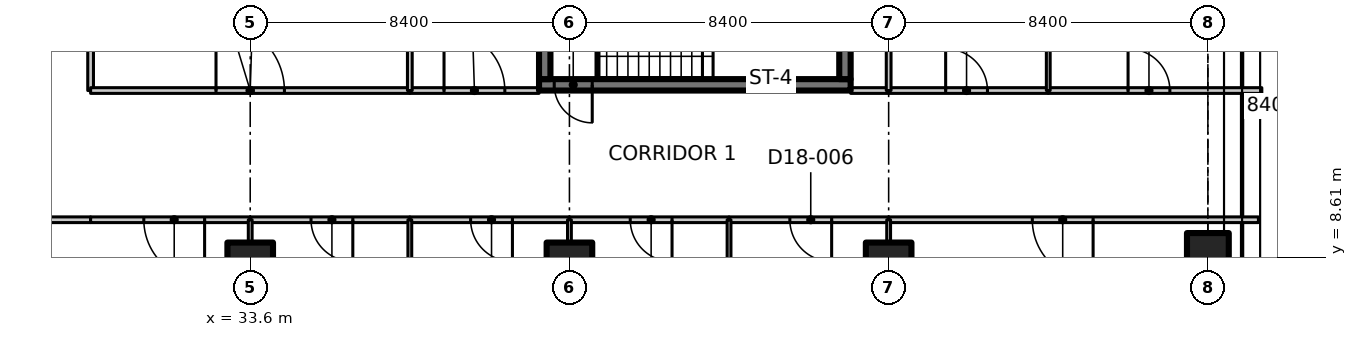
"""IFC4 building model, lengths in metres.
Left out: names, types, materials, properties, quantities, classifications, styles, units other than length and angle.
Written with IfcOpenShell. Run it as: python <this file> out.ifc"""

import sys

from ifc_helpers import new_model, si_unit, direction, frame, frame_2d, origin, origin_2d, place, context, subcontext, project, spatial, polyline, rectangle, outline, extrude, element, fill, save


model = new_model("IFC4")
c1 = context("Model", 3, precision=1e-05, world=origin(), true_north=direction((0.0, 1.0)))
c2 = subcontext(c1, "Body", "Model", "MODEL_VIEW")
j1 = project(units=[si_unit("LENGTHUNIT", "METRE"), si_unit("PLANEANGLEUNIT", "RADIAN")], contexts=[c1])
p1 = place(None, origin())
s1 = spatial("IfcSite", under=j1, at=p1, CompositionType="ELEMENT")
p2 = place(p1, origin())
s2 = spatial("IfcBuilding", under=s1, at=p2, CompositionType="ELEMENT")
p3 = place(p2, frame((0.0, 0.0, 152.9)))
s3 = spatial("IfcBuildingStorey", under=s2, at=p3, CompositionType="ELEMENT", Elevation=152.9)
for number, where, z_axis, x_axis in (
    (1, (33.6, 8.4, 0.0), (0.0, 0.0, 1.0), (1.0, 0.0, 0.0)),
    (2, (42.0, 8.4, 0.0), (0.0, 0.0, 1.0), (1.0, 0.0, 0.0)),
    (3, (50.4, 8.4, 0.0), (0.0, 0.0, 1.0), (1.0, 0.0, 0.0)),
):
    element("IfcColumn", number, at=place(p3, frame(where, z_axis=z_axis, x_axis=x_axis)), inside=s3, PredefinedType="COLUMN", context=c2, shape_type="SweptSolid", body=[
        extrude(rectangle(XDim=1.2, YDim=1.2, at=origin_2d()), origin(), (0.0, 0.0, 1.0), 3.3),
    ])
p4 = place(p3, frame((58.8, 8.4, 0.0), z_axis=(0.0, 0.0, 1.0), x_axis=(1.0, 0.0, 0.0)))
e4 = element("IfcColumn", 4, at=p4, inside=s3, PredefinedType="COLUMN", context=c2, shape_type="SweptSolid", body=[
    extrude(rectangle(XDim=1.1, YDim=1.7, at=origin_2d()), origin(), (0.0, 0.0, 1.0), 3.3),
])
p5 = place(p3, frame((49.4, 13.15, 0.0), z_axis=(0.0, 0.0, 1.0), x_axis=(-1.0, 0.0, 0.0)))
e5 = element("IfcWall", 5, at=p5, inside=s3, PredefinedType="SHEAR", context=c2, shape_type="SweptSolid", body=[
    extrude(rectangle(XDim=8.2, YDim=0.3, at=frame_2d((4.1, 0.0))), origin(), (0.0, 0.0, 1.0), 3.3),
])
p6 = place(p5, frame((6.8, 0.0, 0.0)))
e6 = element("IfcOpeningElement", 6, at=p6, cuts=e5, PredefinedType="OPENING", context=c2, shape_type="SweptSolid", body=[
    extrude(rectangle(XDim=1.0, YDim=2.1, at=frame_2d((0.5, 1.05))), frame((0.0, 0.16, 0.0), z_axis=(0.0, -1.0, 0.0), x_axis=(1.0, 0.0, 0.0)), (0.0, 0.0, 1.0), 0.32),
])
for number, where, z_axis, x_axis in (
    (7, (41.35, 13.3, 0.0), (0.0, 0.0, 1.0), (0.0, 1.0, 0.0)),
    (8, (49.25, 13.3, 0.0), (0.0, 0.0, 1.0), (0.0, 1.0, 0.0)),
):
    element("IfcWall", number, at=place(p3, frame(where, z_axis=z_axis, x_axis=x_axis)), inside=s3, PredefinedType="SHEAR", context=c2, shape_type="SweptSolid", body=[
        extrude(rectangle(XDim=2.55, YDim=0.3, at=frame_2d((1.275, 0.0))), origin(), (0.0, 0.0, 1.0), 3.3),
    ])
p7 = place(p3, frame((29.4, 9.6, 0.0), z_axis=(0.0, 0.0, 1.0), x_axis=(-1.0, 0.0, 0.0)))
e9 = element("IfcWall", 9, at=p7, inside=s3, PredefinedType="PARTITIONING", context=c2, shape_type="SweptSolid", body=[
    extrude(rectangle(XDim=4.2, YDim=0.15, at=frame_2d((2.1, 0.0))), origin(), (0.0, 0.0, 1.0), 3.28),
])
p8 = place(p3, frame((29.4, 21.2, 0.0), z_axis=(0.0, 0.0, 1.0), x_axis=(0.0, -1.0, 0.0)))
e10 = element("IfcWall", 10, at=p8, inside=s3, PredefinedType="PARTITIONING", context=c2, shape_type="SweptSolid", body=[
    extrude(rectangle(XDim=8.2, YDim=0.15, at=frame_2d((4.1, 0.0))), origin(), (0.0, 0.0, 1.0), 3.28),
])
p9 = place(p3, frame((33.6, 9.6, 0.0), z_axis=(0.0, 0.0, 1.0), x_axis=(-1.0, 0.0, 0.0)))
e11 = element("IfcWall", 11, at=p9, inside=s3, PredefinedType="PARTITIONING", context=c2, shape_type="SweptSolid", body=[
    extrude(rectangle(XDim=4.2, YDim=0.15, at=frame_2d((2.1, 0.0))), origin(), (0.0, 0.0, 1.0), 3.28),
])
p10 = place(p9, frame((1.2, 0.0, 0.0)))
e12 = element("IfcOpeningElement", 12, at=p10, cuts=e11, PredefinedType="OPENING", context=c2, shape_type="SweptSolid", body=[
    extrude(rectangle(XDim=1.6, YDim=2.1, at=frame_2d((0.8, 1.05))), frame((0.0, 0.085, 0.0), z_axis=(0.0, -1.0, 0.0), x_axis=(1.0, 0.0, 0.0)), (0.0, 0.0, 1.0), 0.17),
])
p11 = place(p3, frame((37.8, 9.6, 0.0), z_axis=(0.0, 0.0, 1.0), x_axis=(-1.0, 0.0, 0.0)))
e13 = element("IfcWall", 13, at=p11, inside=s3, PredefinedType="PARTITIONING", context=c2, shape_type="SweptSolid", body=[
    extrude(rectangle(XDim=4.2, YDim=0.15, at=frame_2d((2.1, 0.0))), origin(), (0.0, 0.0, 1.0), 3.28),
])
p12 = place(p11, frame((1.5, 0.0, 0.0)))
e14 = element("IfcOpeningElement", 14, at=p12, cuts=e13, PredefinedType="OPENING", context=c2, shape_type="SweptSolid", body=[
    extrude(rectangle(XDim=1.1, YDim=2.1, at=frame_2d((0.55, 1.05))), frame((0.0, 0.085, 0.0), z_axis=(0.0, -1.0, 0.0), x_axis=(1.0, 0.0, 0.0)), (0.0, 0.0, 1.0), 0.17),
])
p13 = place(p3, frame((42.0, 9.6, 0.0), z_axis=(0.0, 0.0, 1.0), x_axis=(-1.0, 0.0, 0.0)))
e15 = element("IfcWall", 15, at=p13, inside=s3, PredefinedType="PARTITIONING", context=c2, shape_type="SweptSolid", body=[
    extrude(rectangle(XDim=4.2, YDim=0.15, at=frame_2d((2.1, 0.0))), origin(), (0.0, 0.0, 1.0), 3.28),
])
p14 = place(p13, frame((1.5, 0.0, 0.0)))
e16 = element("IfcOpeningElement", 16, at=p14, cuts=e15, PredefinedType="OPENING", context=c2, shape_type="SweptSolid", body=[
    extrude(rectangle(XDim=1.1, YDim=2.1, at=frame_2d((0.55, 1.05))), frame((0.0, 0.085, 0.0), z_axis=(0.0, -1.0, 0.0), x_axis=(1.0, 0.0, 0.0)), (0.0, 0.0, 1.0), 0.17),
])
p15 = place(p3, frame((46.2, 9.6, 0.0), z_axis=(0.0, 0.0, 1.0), x_axis=(-1.0, 0.0, 0.0)))
e17 = element("IfcWall", 17, at=p15, inside=s3, PredefinedType="PARTITIONING", context=c2, shape_type="SweptSolid", body=[
    extrude(rectangle(XDim=4.2, YDim=0.15, at=frame_2d((2.1, 0.0))), origin(), (0.0, 0.0, 1.0), 3.28),
])
p16 = place(p15, frame((1.5, 0.0, 0.0)))
e18 = element("IfcOpeningElement", 18, at=p16, cuts=e17, PredefinedType="OPENING", context=c2, shape_type="SweptSolid", body=[
    extrude(rectangle(XDim=1.1, YDim=2.1, at=frame_2d((0.55, 1.05))), frame((0.0, 0.085, 0.0), z_axis=(0.0, -1.0, 0.0), x_axis=(1.0, 0.0, 0.0)), (0.0, 0.0, 1.0), 0.17),
])
p17 = place(p3, frame((50.4, 9.6, 0.0), z_axis=(0.0, 0.0, 1.0), x_axis=(-1.0, 0.0, 0.0)))
e19 = element("IfcWall", 19, at=p17, inside=s3, PredefinedType="PARTITIONING", context=c2, shape_type="SweptSolid", body=[
    extrude(rectangle(XDim=4.2, YDim=0.15, at=frame_2d((2.1, 0.0))), origin(), (0.0, 0.0, 1.0), 3.28),
])
p18 = place(p17, frame((1.5, 0.0, 0.0)))
e20 = element("IfcOpeningElement", 20, at=p18, cuts=e19, PredefinedType="OPENING", context=c2, shape_type="SweptSolid", body=[
    extrude(rectangle(XDim=1.1, YDim=2.1, at=frame_2d((0.55, 1.05))), frame((0.0, 0.085, 0.0), z_axis=(0.0, -1.0, 0.0), x_axis=(1.0, 0.0, 0.0)), (0.0, 0.0, 1.0), 0.17),
])
p19 = place(p3, frame((60.131, 9.6, 0.0), z_axis=(0.0, 0.0, 1.0), x_axis=(-1.0, 0.0, 0.0)))
e21 = element("IfcWall", 21, at=p19, inside=s3, PredefinedType="PARTITIONING", context=c2, shape_type="SweptSolid", body=[
    extrude(outline(polyline([(0.0, 0.0), (9.731, 0.0), (9.73, 3.28), (1.781, 3.28), (1.779, 2.93), (0.883, 2.93), (0.881, 3.28), (0.25, 3.28), (0.0, 3.28), (0.0, 0.0)])), frame((0.0, 0.075, 0.0), z_axis=(0.0, -1.0, 0.0), x_axis=(1.0, 0.0, 0.0)), (0.0, 0.0, 1.0), 0.15),
])
p20 = place(p19, frame((4.351, 0.0, 0.0)))
e22 = element("IfcOpeningElement", 22, at=p20, cuts=e21, PredefinedType="OPENING", context=c2, shape_type="SweptSolid", body=[
    extrude(rectangle(XDim=1.6, YDim=2.1, at=frame_2d((0.8, 1.05))), frame((0.0, 0.085, 0.0), z_axis=(0.0, -1.0, 0.0), x_axis=(1.0, 0.0, 0.0)), (0.0, 0.0, 1.0), 0.17),
])
p21 = place(p3, frame((29.4, 13.0, 0.0), z_axis=(0.0, 0.0, 1.0), x_axis=(1.0, 0.0, 0.0)))
e23 = element("IfcWall", 23, at=p21, inside=s3, PredefinedType="PARTITIONING", context=c2, shape_type="SweptSolid", body=[
    extrude(rectangle(XDim=8.4, YDim=0.15, at=frame_2d((4.2, 0.0))), origin(), (0.0, 0.0, 1.0), 3.28),
])
p22 = place(p21, frame((3.3, 0.0, 0.0)))
e24 = element("IfcOpeningElement", 24, at=p22, cuts=e23, PredefinedType="OPENING", context=c2, shape_type="SweptSolid", body=[
    extrude(rectangle(XDim=1.8, YDim=2.1, at=frame_2d((0.9, 1.05))), frame((0.0, 0.085, 0.0), z_axis=(0.0, -1.0, 0.0), x_axis=(1.0, 0.0, 0.0)), (0.0, 0.0, 1.0), 0.17),
])
p23 = place(p3, frame((37.8, 13.0, 0.0), z_axis=(0.0, 0.0, 1.0), x_axis=(1.0, 0.0, 0.0)))
e25 = element("IfcWall", 25, at=p23, inside=s3, PredefinedType="PARTITIONING", context=c2, shape_type="SweptSolid", body=[
    extrude(rectangle(XDim=3.4, YDim=0.15, at=frame_2d((1.7, 0.0))), origin(), (0.0, 0.0, 1.0), 3.28),
])
p24 = place(p23, frame((0.9, 0.0, 0.0)))
e26 = element("IfcOpeningElement", 26, at=p24, cuts=e25, PredefinedType="OPENING", context=c2, shape_type="SweptSolid", body=[
    extrude(rectangle(XDim=1.6, YDim=2.1, at=frame_2d((0.8, 1.05))), frame((0.0, 0.085, 0.0), z_axis=(0.0, -1.0, 0.0), x_axis=(1.0, 0.0, 0.0)), (0.0, 0.0, 1.0), 0.17),
])
p25 = place(p3, frame((49.4, 13.0, 0.0), z_axis=(0.0, 0.0, 1.0), x_axis=(1.0, 0.0, 0.0)))
e27 = element("IfcWall", 27, at=p25, inside=s3, PredefinedType="PARTITIONING", context=c2, shape_type="SweptSolid", body=[
    extrude(rectangle(XDim=1.0, YDim=0.15, at=frame_2d((0.5, 0.0))), origin(), (0.0, 0.0, 1.0), 3.28),
])
p26 = place(p3, frame((50.4, 13.0, 0.0), z_axis=(0.0, 0.0, 1.0), x_axis=(1.0, 0.0, 0.0)))
e28 = element("IfcWall", 28, at=p26, inside=s3, PredefinedType="PARTITIONING", context=c2, shape_type="SweptSolid", body=[
    extrude(rectangle(XDim=4.2, YDim=0.15, at=frame_2d((2.1, 0.0))), origin(), (0.0, 0.0, 1.0), 3.28),
])
p27 = place(p26, frame((1.5, 0.0, 0.0)))
e29 = element("IfcOpeningElement", 29, at=p27, cuts=e28, PredefinedType="OPENING", context=c2, shape_type="SweptSolid", body=[
    extrude(rectangle(XDim=1.1, YDim=2.1, at=frame_2d((0.55, 1.05))), frame((0.0, 0.085, 0.0), z_axis=(0.0, -1.0, 0.0), x_axis=(1.0, 0.0, 0.0)), (0.0, 0.0, 1.0), 0.17),
])
p28 = place(p3, frame((54.6, 13.0, 0.0), z_axis=(0.0, 0.0, 1.0), x_axis=(1.0, 0.0, 0.0)))
e30 = element("IfcWall", 30, at=p28, inside=s3, PredefinedType="PARTITIONING", context=c2, shape_type="SweptSolid", body=[
    extrude(outline(polyline([(0.0, 0.0), (5.619, 0.0), (5.619, 3.28), (5.28, 3.28), (4.65, 3.28), (4.648, 2.93), (3.752, 2.93), (3.75, 3.28), (0.0, 3.28), (0.0, 0.0)])), frame((0.0, 0.075, 0.0), z_axis=(0.0, -1.0, 0.0), x_axis=(1.0, 0.0, 0.0)), (0.0, 0.0, 1.0), 0.15),
])
p29 = place(p28, frame((2.1, 0.0, 0.0)))
e31 = element("IfcOpeningElement", 31, at=p29, cuts=e30, PredefinedType="OPENING", context=c2, shape_type="SweptSolid", body=[
    extrude(rectangle(XDim=1.1, YDim=2.1, at=frame_2d((0.55, 1.05))), frame((0.0, 0.085, 0.0), z_axis=(0.0, -1.0, 0.0), x_axis=(1.0, 0.0, 0.0)), (0.0, 0.0, 1.0), 0.17),
])
p30 = place(p3, frame((33.6, 9.6, 0.0), z_axis=(0.0, 0.0, 1.0), x_axis=(0.0, -1.0, 0.0)))
e32 = element("IfcWall", 32, at=p30, inside=s3, PredefinedType="PARTITIONING", context=c2, shape_type="SweptSolid", body=[
    extrude(rectangle(XDim=0.58, YDim=0.1, at=frame_2d((0.29, 0.0))), origin(), (0.0, 0.0, 1.0), 3.28),
])
p31 = place(p3, frame((37.8, 9.6, 0.0), z_axis=(0.0, 0.0, 1.0), x_axis=(0.0, -1.0, 0.0)))
e33 = element("IfcWall", 33, at=p31, inside=s3, PredefinedType="PARTITIONING", context=c2, shape_type="SweptSolid", body=[
    extrude(outline(polyline([(0.0, 0.0), (10.965, 0.0), (10.965, 3.28), (10.7, 3.28), (10.05, 3.28), (10.048, 2.93), (9.152, 2.93), (9.15, 3.28), (0.0, 3.28), (0.0, 0.0)])), frame((0.0, 0.05, 0.0), z_axis=(0.0, -1.0, 0.0), x_axis=(1.0, 0.0, 0.0)), (0.0, 0.0, 1.0), 0.1),
])
p32 = place(p3, frame((42.0, 9.6, 0.0), z_axis=(0.0, 0.0, 1.0), x_axis=(0.0, -1.0, 0.0)))
e34 = element("IfcWall", 34, at=p32, inside=s3, PredefinedType="PARTITIONING", context=c2, shape_type="SweptSolid", body=[
    extrude(rectangle(XDim=0.58, YDim=0.1, at=frame_2d((0.29, 0.0))), origin(), (0.0, 0.0, 1.0), 3.28),
])
p33 = place(p3, frame((46.2, 9.6, 0.0), z_axis=(0.0, 0.0, 1.0), x_axis=(0.0, -1.0, 0.0)))
e35 = element("IfcWall", 35, at=p33, inside=s3, PredefinedType="PARTITIONING", context=c2, shape_type="SweptSolid", body=[
    extrude(outline(polyline([(0.0, 0.0), (10.965, 0.0), (10.965, 3.28), (10.7, 3.28), (10.05, 3.28), (10.048, 2.93), (9.152, 2.93), (9.15, 3.28), (0.0, 3.28), (0.0, 0.0)])), frame((0.0, 0.05, 0.0), z_axis=(0.0, -1.0, 0.0), x_axis=(1.0, 0.0, 0.0)), (0.0, 0.0, 1.0), 0.1),
])
p34 = place(p3, frame((50.4, 9.6, 0.0), z_axis=(0.0, 0.0, 1.0), x_axis=(0.0, -1.0, 0.0)))
e36 = element("IfcWall", 36, at=p34, inside=s3, PredefinedType="PARTITIONING", context=c2, shape_type="SweptSolid", body=[
    extrude(rectangle(XDim=0.58, YDim=0.1, at=frame_2d((0.29, 0.0))), origin(), (0.0, 0.0, 1.0), 3.28),
])
p35 = place(p3, frame((37.8, 30.243, 0.0), z_axis=(0.0, 0.0, 1.0), x_axis=(0.0, -1.0, 0.0)))
e37 = element("IfcWall", 37, at=p35, inside=s3, PredefinedType="PARTITIONING", context=c2, shape_type="SweptSolid", body=[
    extrude(outline(polyline([(0.0, 0.0), (17.243, 0.0), (17.243, 3.28), (5.493, 3.28), (5.491, 2.93), (4.595, 2.93), (4.593, 3.28), (0.0, 3.28), (0.0, 0.0)])), frame((0.0, 0.062, 0.0), z_axis=(0.0, -1.0, 0.0), x_axis=(1.0, 0.0, 0.0)), (0.0, 0.0, 1.0), 0.125),
])
p36 = place(p3, frame((50.4, 16.18, 0.0), z_axis=(0.0, 0.0, 1.0), x_axis=(0.0, -1.0, 0.0)))
e38 = element("IfcWall", 38, at=p36, inside=s3, PredefinedType="PARTITIONING", context=c2, shape_type="SweptSolid", body=[
    extrude(rectangle(XDim=3.18, YDim=0.125, at=frame_2d((1.59, 0.0))), origin(), (0.0, 0.0, 1.0), 3.28),
])
p37 = place(p3, frame((54.6, 25.502, 0.0), z_axis=(0.0, 0.0, 1.0), x_axis=(0.0, -1.0, 0.0)))
e39 = element("IfcWall", 39, at=p37, inside=s3, PredefinedType="PARTITIONING", context=c2, shape_type="SweptSolid", body=[
    extrude(outline(polyline([(0.0, 0.0), (12.502, 0.0), (12.502, 3.28), (5.168, 3.28), (5.166, 2.93), (3.839, 2.93), (3.837, 3.28), (0.103, 3.28), (0.0, 3.28), (0.0, 0.0)])), frame((0.0, 0.05, 0.0), z_axis=(0.0, -1.0, 0.0), x_axis=(1.0, 0.0, 0.0)), (0.0, 0.0, 1.0), 0.1),
])
p38 = place(p6, origin())
e40 = element("IfcDoor", 40, at=p38, inside=s3, OperationType="SINGLE_SWING_LEFT", PredefinedType="DOOR", context=c2, shape_type="SweptSolid", body=[
    extrude(rectangle(XDim=1.0, YDim=2.1, at=frame_2d((0.5, 1.05))), frame((0.0, 0.025, 0.0), z_axis=(0.0, -1.0, 0.0), x_axis=(1.0, 0.0, 0.0)), (0.0, 0.0, 1.0), 0.05),
])
fill(e6, e40)
p39 = place(p10, origin())
e41 = element("IfcDoor", 41, at=p39, inside=s3, OperationType="DOUBLE_DOOR_SINGLE_SWING", PredefinedType="DOOR", context=c2, shape_type="SweptSolid", body=[
    extrude(rectangle(XDim=1.6, YDim=2.1, at=frame_2d((0.8, 1.05))), frame((0.0, 0.025, 0.0), z_axis=(0.0, -1.0, 0.0), x_axis=(1.0, 0.0, 0.0)), (0.0, 0.0, 1.0), 0.05),
])
fill(e12, e41)
p40 = place(p12, origin())
e42 = element("IfcDoor", 42, at=p40, inside=s3, OperationType="SINGLE_SWING_LEFT", PredefinedType="DOOR", context=c2, shape_type="SweptSolid", body=[
    extrude(rectangle(XDim=1.1, YDim=2.1, at=frame_2d((0.55, 1.05))), frame((0.0, 0.025, 0.0), z_axis=(0.0, -1.0, 0.0), x_axis=(1.0, 0.0, 0.0)), (0.0, 0.0, 1.0), 0.05),
])
fill(e14, e42)
p41 = place(p14, origin())
e43 = element("IfcDoor", 43, at=p41, inside=s3, OperationType="SINGLE_SWING_LEFT", PredefinedType="DOOR", context=c2, shape_type="SweptSolid", body=[
    extrude(rectangle(XDim=1.1, YDim=2.1, at=frame_2d((0.55, 1.05))), frame((0.0, 0.025, 0.0), z_axis=(0.0, -1.0, 0.0), x_axis=(1.0, 0.0, 0.0)), (0.0, 0.0, 1.0), 0.05),
])
fill(e16, e43)
p42 = place(p16, origin())
e44 = element("IfcDoor", 44, at=p42, inside=s3, OperationType="SINGLE_SWING_LEFT", PredefinedType="DOOR", context=c2, shape_type="SweptSolid", body=[
    extrude(rectangle(XDim=1.1, YDim=2.1, at=frame_2d((0.55, 1.05))), frame((0.0, 0.025, 0.0), z_axis=(0.0, -1.0, 0.0), x_axis=(1.0, 0.0, 0.0)), (0.0, 0.0, 1.0), 0.05),
])
fill(e18, e44)
p43 = place(p18, origin())
e45 = element("IfcDoor", 45, at=p43, inside=s3, OperationType="SINGLE_SWING_LEFT", PredefinedType="DOOR", context=c2, shape_type="SweptSolid", body=[
    extrude(rectangle(XDim=1.1, YDim=2.1, at=frame_2d((0.55, 1.05))), frame((0.0, 0.025, 0.0), z_axis=(0.0, -1.0, 0.0), x_axis=(1.0, 0.0, 0.0)), (0.0, 0.0, 1.0), 0.05),
])
fill(e20, e45)
p44 = place(p20, origin())
e46 = element("IfcDoor", 46, at=p44, inside=s3, OperationType="DOUBLE_DOOR_SINGLE_SWING", PredefinedType="DOOR", context=c2, shape_type="SweptSolid", body=[
    extrude(rectangle(XDim=1.6, YDim=2.1, at=frame_2d((0.8, 1.05))), frame((0.0, 0.025, 0.0), z_axis=(0.0, -1.0, 0.0), x_axis=(1.0, 0.0, 0.0)), (0.0, 0.0, 1.0), 0.05),
])
fill(e22, e46)
p45 = place(p22, origin())
e47 = element("IfcDoor", 47, at=p45, inside=s3, OperationType="DOUBLE_DOOR_SINGLE_SWING", PredefinedType="DOOR", context=c2, shape_type="SweptSolid", body=[
    extrude(rectangle(XDim=1.8, YDim=2.1, at=frame_2d((0.9, 1.05))), frame((0.0, 0.025, 0.0), z_axis=(0.0, -1.0, 0.0), x_axis=(1.0, 0.0, 0.0)), (0.0, 0.0, 1.0), 0.05),
])
fill(e24, e47)
p46 = place(p24, origin())
e48 = element("IfcDoor", 48, at=p46, inside=s3, OperationType="DOUBLE_DOOR_SINGLE_SWING", PredefinedType="DOOR", context=c2, shape_type="SweptSolid", body=[
    extrude(rectangle(XDim=1.6, YDim=2.1, at=frame_2d((0.8, 1.05))), frame((0.0, 0.025, 0.0), z_axis=(0.0, -1.0, 0.0), x_axis=(1.0, 0.0, 0.0)), (0.0, 0.0, 1.0), 0.05),
])
fill(e26, e48)
p47 = place(p27, origin())
e49 = element("IfcDoor", 49, at=p47, inside=s3, OperationType="SINGLE_SWING_LEFT", PredefinedType="DOOR", context=c2, shape_type="SweptSolid", body=[
    extrude(rectangle(XDim=1.1, YDim=2.1, at=frame_2d((0.55, 1.05))), frame((0.0, 0.025, 0.0), z_axis=(0.0, -1.0, 0.0), x_axis=(1.0, 0.0, 0.0)), (0.0, 0.0, 1.0), 0.05),
])
fill(e29, e49)
p48 = place(p29, origin())
e50 = element("IfcDoor", 50, at=p48, inside=s3, OperationType="SINGLE_SWING_LEFT", PredefinedType="DOOR", context=c2, shape_type="SweptSolid", body=[
    extrude(rectangle(XDim=1.1, YDim=2.1, at=frame_2d((0.55, 1.05))), frame((0.0, 0.025, 0.0), z_axis=(0.0, -1.0, 0.0), x_axis=(1.0, 0.0, 0.0)), (0.0, 0.0, 1.0), 0.05),
])
fill(e31, e50)
save(model, sys.argv[1])
